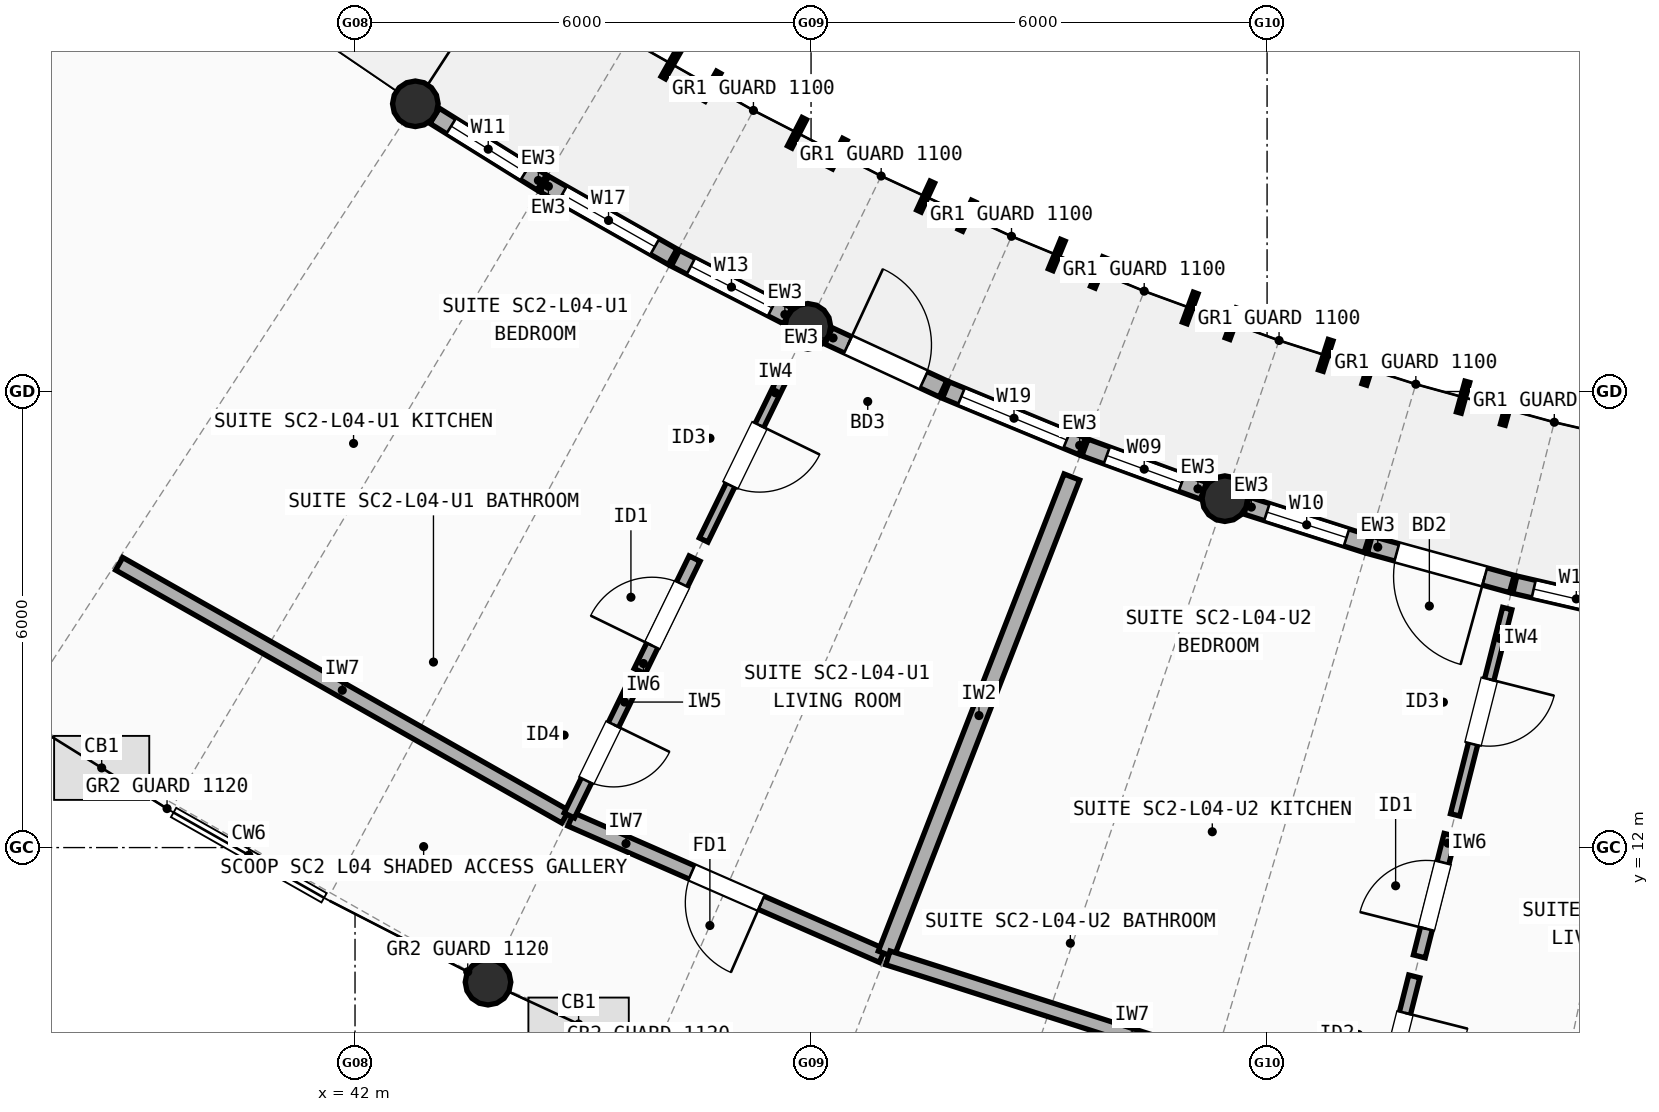
"""IFC4 building model, lengths in metres.
Left out: names, types, materials, properties, quantities, classifications, styles, units other than length and angle.
Written with IfcOpenShell. Run it as: python <this file> out.ifc"""

import sys

from ifc_helpers import new_model, si_unit, direction, frame, frame_2d, origin, origin_2d, place, context, subcontext, project, spatial, rectangle, circle, extrude, element, fill, save


model = new_model("IFC4")
c1 = context("Model", 3, precision=1e-05, world=origin(), true_north=direction((0.0, 1.0)))
c2 = subcontext(c1, "Body", "Model", "MODEL_VIEW")
j1 = project(units=[si_unit("LENGTHUNIT", "METRE"), si_unit("PLANEANGLEUNIT", "RADIAN")], contexts=[c1])
p1 = place(None, origin())
s1 = spatial("IfcSite", under=j1, at=p1, CompositionType="ELEMENT")
p2 = place(p1, origin())
s2 = spatial("IfcBuilding", under=s1, at=p2, CompositionType="ELEMENT")
p3 = place(p2, frame((0.0, 0.0, 14.1)))
s3 = spatial("IfcBuildingStorey", under=s2, at=p3, CompositionType="ELEMENT", Elevation=14.1)
for number, where, z_axis, x_axis in (
    (1, (42.793, 21.785, 0.0), (0.0, 0.0, 1.0), (1.0, 0.0, 0.0)),
    (2, (47.958, 18.858, 0.0), (0.0, 0.0, 1.0), (1.0, 0.0, 0.0)),
    (3, (43.75, 10.229, 0.0), (0.0, 0.0, 1.0), (1.0, 0.0, 0.0)),
    (4, (53.445, 16.59, 0.0), (0.0, 0.0, 1.0), (1.0, 0.0, 0.0)),
):
    element("IfcColumn", number, at=place(p3, frame(where, z_axis=z_axis, x_axis=x_axis)), inside=s3, PredefinedType="COLUMN", context=c2, shape_type="SweptSolid", body=[
        extrude(circle(Radius=0.3, at=origin_2d()), origin(), (0.0, 0.0, 1.0), 2.948),
    ])
p4 = place(p3, frame((43.048, 21.627, 0.0), z_axis=(0.0, 0.0, 1.0), x_axis=(0.848955427013, -0.528464457598, 0.0)))
e5 = element("IfcWall", 5, at=p4, inside=s3, PredefinedType="STANDARD", context=c2, shape_type="SweptSolid", body=[
    extrude(rectangle(XDim=1.66, YDim=0.235, at=frame_2d((0.83, 0.0))), origin(), (0.0, 0.0, 1.0), 2.684),
])
p5 = place(p4, frame((0.255, 0.0, 0.85)))
e6 = element("IfcOpeningElement", 6, at=p5, cuts=e5, PredefinedType="OPENING", context=c2, shape_type="SweptSolid", body=[
    extrude(rectangle(XDim=1.15, YDim=1.45, at=frame_2d((0.575, 0.725))), frame((0.0, 0.127, 0.0), z_axis=(0.0, -1.0, 0.0), x_axis=(1.0, 0.0, 0.0)), (0.0, 0.0, 1.0), 0.255),
])
p6 = place(p3, frame((44.492, 20.729, 0.0), z_axis=(0.0, 0.0, 1.0), x_axis=(0.86993400964, -0.493168144623, 0.0)))
e7 = element("IfcWall", 7, at=p6, inside=s3, PredefinedType="STANDARD", context=c2, shape_type="SweptSolid", body=[
    extrude(rectangle(XDim=1.94, YDim=0.235, at=frame_2d((0.97, 0.0))), origin(), (0.0, 0.0, 1.0), 2.684),
])
p7 = place(p6, frame((0.27, 0.0, 0.85)))
e8 = element("IfcOpeningElement", 8, at=p7, cuts=e7, PredefinedType="OPENING", context=c2, shape_type="SweptSolid", body=[
    extrude(rectangle(XDim=1.4, YDim=1.5, at=frame_2d((0.7, 0.75))), frame((0.0, 0.127, 0.0), z_axis=(0.0, -1.0, 0.0), x_axis=(1.0, 0.0, 0.0)), (0.0, 0.0, 1.0), 0.255),
])
p8 = place(p3, frame((46.215, 19.753, 0.0), z_axis=(0.0, 0.0, 1.0), x_axis=(0.889521792954, -0.456892744372, 0.0)))
e9 = element("IfcWall", 9, at=p8, inside=s3, PredefinedType="STANDARD", context=c2, shape_type="SweptSolid", body=[
    extrude(rectangle(XDim=1.66, YDim=0.235, at=frame_2d((0.83, 0.0))), origin(), (0.0, 0.0, 1.0), 2.684),
])
p9 = place(p8, frame((0.23, 0.0, 0.85)))
e10 = element("IfcOpeningElement", 10, at=p9, cuts=e9, PredefinedType="OPENING", context=c2, shape_type="SweptSolid", body=[
    extrude(rectangle(XDim=1.2, YDim=1.45, at=frame_2d((0.6, 0.725))), frame((0.0, 0.127, 0.0), z_axis=(0.0, -1.0, 0.0), x_axis=(1.0, 0.0, 0.0)), (0.0, 0.0, 1.0), 0.255),
])
p10 = place(p3, frame((48.23, 18.732, 0.0), z_axis=(0.0, 0.0, 1.0), x_axis=(0.907631944022, -0.419766904592, 0.0)))
e11 = element("IfcWall", 11, at=p10, inside=s3, PredefinedType="STANDARD", context=c2, shape_type="SweptSolid", body=[
    extrude(rectangle(XDim=1.66, YDim=0.235, at=frame_2d((0.83, 0.0))), origin(), (0.0, 0.0, 1.0), 2.684),
])
p11 = place(p10, frame((0.28, 0.0, 0.0)))
e12 = element("IfcOpeningElement", 12, at=p11, cuts=e11, PredefinedType="OPENING", context=c2, shape_type="SweptSolid", body=[
    extrude(rectangle(XDim=1.1, YDim=2.15, at=frame_2d((0.55, 1.075))), frame((0.0, 0.127, 0.0), z_axis=(0.0, -1.0, 0.0), x_axis=(1.0, 0.0, 0.0)), (0.0, 0.0, 1.0), 0.255),
])
p12 = place(p3, frame((49.774, 18.019, 0.0), z_axis=(0.0, 0.0, 1.0), x_axis=(0.92414555515, -0.382040564465, 0.0)))
e13 = element("IfcWall", 13, at=p12, inside=s3, PredefinedType="STANDARD", context=c2, shape_type="SweptSolid", body=[
    extrude(rectangle(XDim=1.94, YDim=0.235, at=frame_2d((0.97, 0.0))), origin(), (0.0, 0.0, 1.0), 2.684),
])
p13 = place(p12, frame((0.22, 0.0, 0.85)))
e14 = element("IfcOpeningElement", 14, at=p13, cuts=e13, PredefinedType="OPENING", context=c2, shape_type="SweptSolid", body=[
    extrude(rectangle(XDim=1.5, YDim=1.5, at=frame_2d((0.75, 0.75))), frame((0.0, 0.127, 0.0), z_axis=(0.0, -1.0, 0.0), x_axis=(1.0, 0.0, 0.0)), (0.0, 0.0, 1.0), 0.255),
])
p14 = place(p3, frame((51.604, 17.264, 0.0), z_axis=(0.0, 0.0, 1.0), x_axis=(0.939139054149, -0.343537242482, 0.0)))
e15 = element("IfcWall", 15, at=p14, inside=s3, PredefinedType="STANDARD", context=c2, shape_type="SweptSolid", body=[
    extrude(rectangle(XDim=1.66, YDim=0.235, at=frame_2d((0.83, 0.0))), origin(), (0.0, 0.0, 1.0), 2.684),
])
p15 = place(p14, frame((0.305, 0.0, 0.85)))
e16 = element("IfcOpeningElement", 16, at=p15, cuts=e15, PredefinedType="OPENING", context=c2, shape_type="SweptSolid", body=[
    extrude(rectangle(XDim=1.05, YDim=1.35, at=frame_2d((0.525, 0.675))), frame((0.0, 0.127, 0.0), z_axis=(0.0, -1.0, 0.0), x_axis=(1.0, 0.0, 0.0)), (0.0, 0.0, 1.0), 0.255),
])
p16 = place(p3, frame((53.731, 16.499, 0.0), z_axis=(0.0, 0.0, 1.0), x_axis=(0.952523149859, -0.304466170508, 0.0)))
e17 = element("IfcWall", 17, at=p16, inside=s3, PredefinedType="STANDARD", context=c2, shape_type="SweptSolid", body=[
    extrude(rectangle(XDim=1.66, YDim=0.235, at=frame_2d((0.83, 0.0))), origin(), (0.0, 0.0, 1.0), 2.684),
])
p17 = place(p16, frame((0.28, 0.0, 0.85)))
e18 = element("IfcOpeningElement", 18, at=p17, cuts=e17, PredefinedType="OPENING", context=c2, shape_type="SweptSolid", body=[
    extrude(rectangle(XDim=1.1, YDim=1.45, at=frame_2d((0.55, 0.725))), frame((0.0, 0.127, 0.0), z_axis=(0.0, -1.0, 0.0), x_axis=(1.0, 0.0, 0.0)), (0.0, 0.0, 1.0), 0.255),
])
p18 = place(p3, frame((55.35, 15.982, 0.0), z_axis=(0.0, 0.0, 1.0), x_axis=(0.964271323293, -0.264916619098, 0.0)))
e19 = element("IfcWall", 19, at=p18, inside=s3, PredefinedType="STANDARD", context=c2, shape_type="SweptSolid", body=[
    extrude(rectangle(XDim=1.94, YDim=0.235, at=frame_2d((0.97, 0.0))), origin(), (0.0, 0.0, 1.0), 2.684),
])
p19 = place(p18, frame((0.37, 0.0, 0.0)))
e20 = element("IfcOpeningElement", 20, at=p19, cuts=e19, PredefinedType="OPENING", context=c2, shape_type="SweptSolid", body=[
    extrude(rectangle(XDim=1.2, YDim=2.15, at=frame_2d((0.6, 1.075))), frame((0.0, 0.127, 0.0), z_axis=(0.0, -1.0, 0.0), x_axis=(1.0, 0.0, 0.0)), (0.0, 0.0, 1.0), 0.255),
])
p20 = place(p3, frame((57.26, 15.458, 0.0), z_axis=(0.0, 0.0, 1.0), x_axis=(0.974354001174, -0.225020622158, 0.0)))
e21 = element("IfcWall", 21, at=p20, inside=s3, PredefinedType="STANDARD", context=c2, shape_type="SweptSolid", body=[
    extrude(rectangle(XDim=1.66, YDim=0.235, at=frame_2d((0.83, 0.0))), origin(), (0.0, 0.0, 1.0), 2.684),
])
p21 = place(p20, frame((0.255, 0.0, 0.85)))
e22 = element("IfcOpeningElement", 22, at=p21, cuts=e21, PredefinedType="OPENING", context=c2, shape_type="SweptSolid", body=[
    extrude(rectangle(XDim=1.15, YDim=1.45, at=frame_2d((0.575, 0.725))), frame((0.0, 0.127, 0.0), z_axis=(0.0, -1.0, 0.0), x_axis=(1.0, 0.0, 0.0)), (0.0, 0.0, 1.0), 0.255),
])
p22 = place(p3, frame((38.897, 15.733, 0.0), z_axis=(0.0, 0.0, 1.0), x_axis=(0.86996578951, -0.493112081664, 0.0)))
e23 = element("IfcWall", 23, at=p22, inside=s3, PredefinedType="SOLIDWALL", context=c2, shape_type="SweptSolid", body=[
    extrude(rectangle(XDim=6.747, YDim=0.19, at=frame_2d((3.374, 0.0))), origin(), (0.0, 0.0, 1.0), 2.742),
])
p23 = place(p3, frame((44.838, 12.371, 0.0), z_axis=(0.0, 0.0, 1.0), x_axis=(0.91610596958, -0.40093621999, 0.0)))
e24 = element("IfcWall", 24, at=p23, inside=s3, PredefinedType="SOLIDWALL", context=c2, shape_type="SweptSolid", body=[
    extrude(rectangle(XDim=4.473, YDim=0.19, at=frame_2d((2.237, 0.0))), origin(), (0.0, 0.0, 1.0), 2.742),
])
p24 = place(p23, frame((1.737, 0.0, 0.0)))
e25 = element("IfcOpeningElement", 25, at=p24, cuts=e24, PredefinedType="OPENING", context=c2, shape_type="SweptSolid", body=[
    extrude(rectangle(XDim=1.0, YDim=2.15, at=frame_2d((0.5, 1.075))), frame((0.0, 0.105, 0.0), z_axis=(0.0, -1.0, 0.0), x_axis=(1.0, 0.0, 0.0)), (0.0, 0.0, 1.0), 0.21),
])
p25 = place(p3, frame((47.674, 18.275, 0.0), z_axis=(0.0, 0.0, 1.0), x_axis=(-0.438371263406, -0.898793989421, 0.0)))
e26 = element("IfcWall", 26, at=p25, inside=s3, PredefinedType="PARTITIONING", context=c2, shape_type="SweptSolid", body=[
    extrude(rectangle(XDim=2.48, YDim=0.125, at=frame_2d((1.24, 0.0))), origin(), (0.0, 0.0, 1.0), 2.722),
])
p26 = place(p25, frame((0.8, 0.0, 0.0)))
e27 = element("IfcOpeningElement", 27, at=p26, cuts=e26, PredefinedType="OPENING", context=c2, shape_type="SweptSolid", body=[
    extrude(rectangle(XDim=0.88, YDim=2.1, at=frame_2d((0.44, 1.05))), frame((0.0, 0.073, 0.0), z_axis=(0.0, -1.0, 0.0), x_axis=(1.0, 0.0, 0.0)), (0.0, 0.0, 1.0), 0.145),
])
p27 = place(p3, frame((46.468, 15.802, 0.0), z_axis=(0.0, 0.0, 1.0), x_axis=(-0.438482002729, -0.898739969782, 0.0)))
e28 = element("IfcWall", 28, at=p27, inside=s3, PredefinedType="PLUMBINGWALL", context=c2, shape_type="SweptSolid", body=[
    extrude(rectangle(XDim=1.648, YDim=0.16, at=frame_2d((0.824, 0.0))), origin(), (0.0, 0.0, 1.0), 2.722),
])
p28 = place(p27, frame((0.374, 0.0, 0.0)))
e29 = element("IfcOpeningElement", 29, at=p28, cuts=e28, PredefinedType="OPENING", context=c2, shape_type="SweptSolid", body=[
    extrude(rectangle(XDim=0.9, YDim=2.1, at=frame_2d((0.45, 1.05))), frame((0.0, 0.09, 0.0), z_axis=(0.0, -1.0, 0.0), x_axis=(1.0, 0.0, 0.0)), (0.0, 0.0, 1.0), 0.18),
])
p29 = place(p3, frame((45.626, 14.076, 0.0), z_axis=(0.0, 0.0, 1.0), x_axis=(-0.438488979871, -0.898736565703, 0.0)))
e30 = element("IfcWall", 30, at=p29, inside=s3, PredefinedType="PARTITIONING", context=c2, shape_type="SweptSolid", body=[
    extrude(rectangle(XDim=1.84, YDim=0.15, at=frame_2d((0.92, 0.0))), origin(), (0.0, 0.0, 1.0), 2.722),
])
p30 = place(p29, frame((0.51, 0.0, 0.0)))
e31 = element("IfcOpeningElement", 31, at=p30, cuts=e30, PredefinedType="OPENING", context=c2, shape_type="SweptSolid", body=[
    extrude(rectangle(XDim=0.82, YDim=2.08, at=frame_2d((0.41, 1.04))), frame((0.0, 0.085, 0.0), z_axis=(0.0, -1.0, 0.0), x_axis=(1.0, 0.0, 0.0)), (0.0, 0.0, 1.0), 0.17),
])
p31 = place(p3, frame((51.431, 16.875, 0.0), z_axis=(0.0, 0.0, 1.0), x_axis=(-0.362801288891, -0.931866527341, 0.0)))
e32 = element("IfcWall", 32, at=p31, inside=s3, PredefinedType="SOLIDWALL", context=c2, shape_type="SweptSolid", body=[
    extrude(rectangle(XDim=6.736, YDim=0.22, at=frame_2d((3.368, 0.0))), origin(), (0.0, 0.0, 1.0), 2.762),
])
p32 = place(p3, frame((49.011, 10.549, 0.0), z_axis=(0.0, 0.0, 1.0), x_axis=(0.952529122406, -0.304447484746, 0.0)))
e33 = element("IfcWall", 33, at=p32, inside=s3, PredefinedType="SOLIDWALL", context=c2, shape_type="SweptSolid", body=[
    extrude(rectangle(XDim=6.747, YDim=0.19, at=frame_2d((3.374, 0.0))), origin(), (0.0, 0.0, 1.0), 2.722),
])
p33 = place(p3, frame((57.16, 15.145, 0.0), z_axis=(0.0, 0.0, 1.0), x_axis=(-0.245017317517, -0.969518702304, 0.0)))
e34 = element("IfcWall", 34, at=p33, inside=s3, PredefinedType="PARTITIONING", context=c2, shape_type="SweptSolid", body=[
    extrude(rectangle(XDim=2.8, YDim=0.125, at=frame_2d((1.4, 0.0))), origin(), (0.0, 0.0, 1.0), 2.762),
])
p34 = place(p33, frame((0.96, 0.0, 0.0)))
e35 = element("IfcOpeningElement", 35, at=p34, cuts=e34, PredefinedType="OPENING", context=c2, shape_type="SweptSolid", body=[
    extrude(rectangle(XDim=0.88, YDim=2.1, at=frame_2d((0.44, 1.05))), frame((0.0, 0.073, 0.0), z_axis=(0.0, -1.0, 0.0), x_axis=(1.0, 0.0, 0.0)), (0.0, 0.0, 1.0), 0.145),
])
p35 = place(p3, frame((56.407, 12.167, 0.0), z_axis=(0.0, 0.0, 1.0), x_axis=(-0.245044695728, -0.969511782855, 0.0)))
e36 = element("IfcWall", 36, at=p35, inside=s3, PredefinedType="PLUMBINGWALL", context=c2, shape_type="SweptSolid", body=[
    extrude(rectangle(XDim=1.648, YDim=0.16, at=frame_2d((0.824, 0.0))), origin(), (0.0, 0.0, 1.0), 2.762),
])
p36 = place(p35, frame((0.374, 0.0, 0.0)))
e37 = element("IfcOpeningElement", 37, at=p36, cuts=e36, PredefinedType="OPENING", context=c2, shape_type="SweptSolid", body=[
    extrude(rectangle(XDim=0.9, YDim=2.1, at=frame_2d((0.45, 1.05))), frame((0.0, 0.09, 0.0), z_axis=(0.0, -1.0, 0.0), x_axis=(1.0, 0.0, 0.0)), (0.0, 0.0, 1.0), 0.18),
])
p37 = place(p3, frame((55.937, 10.305, 0.0), z_axis=(0.0, 0.0, 1.0), x_axis=(-0.24497035727, -0.969530568914, 0.0)))
e38 = element("IfcWall", 38, at=p37, inside=s3, PredefinedType="PARTITIONING", context=c2, shape_type="SweptSolid", body=[
    extrude(rectangle(XDim=1.84, YDim=0.15, at=frame_2d((0.92, 0.0))), origin(), (0.0, 0.0, 1.0), 2.762),
])
p38 = place(p37, frame((0.495, 0.0, 0.0)))
e39 = element("IfcOpeningElement", 39, at=p38, cuts=e38, PredefinedType="OPENING", context=c2, shape_type="SweptSolid", body=[
    extrude(rectangle(XDim=0.85, YDim=2.1, at=frame_2d((0.425, 1.05))), frame((0.0, 0.085, 0.0), z_axis=(0.0, -1.0, 0.0), x_axis=(1.0, 0.0, 0.0)), (0.0, 0.0, 1.0), 0.17),
])
p39 = place(p5, origin())
e40 = element("IfcWindow", 40, at=p39, inside=s3, PartitioningType="SINGLE_PANEL", PredefinedType="WINDOW", context=c2, shape_type="SweptSolid", body=[
    extrude(rectangle(XDim=1.15, YDim=1.45, at=frame_2d((0.575, 0.725))), frame((0.0, 0.03, 0.0), z_axis=(0.0, -1.0, 0.0), x_axis=(1.0, 0.0, 0.0)), (0.0, 0.0, 1.0), 0.06),
])
fill(e6, e40)
p40 = place(p7, origin())
e41 = element("IfcWindow", 41, at=p40, inside=s3, PartitioningType="SINGLE_PANEL", PredefinedType="WINDOW", context=c2, shape_type="SweptSolid", body=[
    extrude(rectangle(XDim=1.4, YDim=1.5, at=frame_2d((0.7, 0.75))), frame((0.0, 0.03, 0.0), z_axis=(0.0, -1.0, 0.0), x_axis=(1.0, 0.0, 0.0)), (0.0, 0.0, 1.0), 0.06),
])
fill(e8, e41)
p41 = place(p9, origin())
e42 = element("IfcWindow", 42, at=p41, inside=s3, PartitioningType="SINGLE_PANEL", PredefinedType="WINDOW", context=c2, shape_type="SweptSolid", body=[
    extrude(rectangle(XDim=1.2, YDim=1.45, at=frame_2d((0.6, 0.725))), frame((0.0, 0.03, 0.0), z_axis=(0.0, -1.0, 0.0), x_axis=(1.0, 0.0, 0.0)), (0.0, 0.0, 1.0), 0.06),
])
fill(e10, e42)
p42 = place(p11, origin())
e43 = element("IfcDoor", 43, at=p42, inside=s3, OperationType="SINGLE_SWING_LEFT", PredefinedType="DOOR", context=c2, shape_type="SweptSolid", body=[
    extrude(rectangle(XDim=1.1, YDim=2.15, at=frame_2d((0.55, 1.075))), frame((0.0, 0.025, 0.0), z_axis=(0.0, -1.0, 0.0), x_axis=(1.0, 0.0, 0.0)), (0.0, 0.0, 1.0), 0.05),
])
fill(e12, e43)
p43 = place(p13, origin())
e44 = element("IfcWindow", 44, at=p43, inside=s3, PartitioningType="SINGLE_PANEL", PredefinedType="WINDOW", context=c2, shape_type="SweptSolid", body=[
    extrude(rectangle(XDim=1.5, YDim=1.5, at=frame_2d((0.75, 0.75))), frame((0.0, 0.03, 0.0), z_axis=(0.0, -1.0, 0.0), x_axis=(1.0, 0.0, 0.0)), (0.0, 0.0, 1.0), 0.06),
])
fill(e14, e44)
p44 = place(p15, origin())
e45 = element("IfcWindow", 45, at=p44, inside=s3, PartitioningType="SINGLE_PANEL", PredefinedType="WINDOW", context=c2, shape_type="SweptSolid", body=[
    extrude(rectangle(XDim=1.05, YDim=1.35, at=frame_2d((0.525, 0.675))), frame((0.0, 0.03, 0.0), z_axis=(0.0, -1.0, 0.0), x_axis=(1.0, 0.0, 0.0)), (0.0, 0.0, 1.0), 0.06),
])
fill(e16, e45)
p45 = place(p17, origin())
e46 = element("IfcWindow", 46, at=p45, inside=s3, PartitioningType="SINGLE_PANEL", PredefinedType="WINDOW", context=c2, shape_type="SweptSolid", body=[
    extrude(rectangle(XDim=1.1, YDim=1.45, at=frame_2d((0.55, 0.725))), frame((0.0, 0.03, 0.0), z_axis=(0.0, -1.0, 0.0), x_axis=(1.0, 0.0, 0.0)), (0.0, 0.0, 1.0), 0.06),
])
fill(e18, e46)
p46 = place(p19, origin())
e47 = element("IfcDoor", 47, at=p46, inside=s3, OperationType="SINGLE_SWING_RIGHT", PredefinedType="DOOR", context=c2, shape_type="SweptSolid", body=[
    extrude(rectangle(XDim=1.2, YDim=2.15, at=frame_2d((0.6, 1.075))), frame((0.0, 0.025, 0.0), z_axis=(0.0, -1.0, 0.0), x_axis=(1.0, 0.0, 0.0)), (0.0, 0.0, 1.0), 0.05),
])
fill(e20, e47)
p47 = place(p21, origin())
e48 = element("IfcWindow", 48, at=p47, inside=s3, PartitioningType="SINGLE_PANEL", PredefinedType="WINDOW", context=c2, shape_type="SweptSolid", body=[
    extrude(rectangle(XDim=1.15, YDim=1.45, at=frame_2d((0.575, 0.725))), frame((0.0, 0.03, 0.0), z_axis=(0.0, -1.0, 0.0), x_axis=(1.0, 0.0, 0.0)), (0.0, 0.0, 1.0), 0.06),
])
fill(e22, e48)
p48 = place(p24, origin())
e49 = element("IfcDoor", 49, at=p48, inside=s3, OperationType="SINGLE_SWING_RIGHT", PredefinedType="DOOR", context=c2, shape_type="SweptSolid", body=[
    extrude(rectangle(XDim=1.0, YDim=2.15, at=frame_2d((0.5, 1.075))), frame((0.0, 0.025, 0.0), z_axis=(0.0, -1.0, 0.0), x_axis=(1.0, 0.0, 0.0)), (0.0, 0.0, 1.0), 0.05),
])
fill(e25, e49)
p49 = place(p26, origin())
e50 = element("IfcDoor", 50, at=p49, inside=s3, OperationType="SINGLE_SWING_LEFT", PredefinedType="DOOR", context=c2, shape_type="SweptSolid", body=[
    extrude(rectangle(XDim=0.88, YDim=2.1, at=frame_2d((0.44, 1.05))), frame((0.0, 0.025, 0.0), z_axis=(0.0, -1.0, 0.0), x_axis=(1.0, 0.0, 0.0)), (0.0, 0.0, 1.0), 0.05),
])
fill(e27, e50)
p50 = place(p28, origin())
e51 = element("IfcDoor", 51, at=p50, inside=s3, OperationType="SINGLE_SWING_RIGHT", PredefinedType="DOOR", context=c2, shape_type="SweptSolid", body=[
    extrude(rectangle(XDim=0.9, YDim=2.1, at=frame_2d((0.45, 1.05))), frame((0.0, 0.025, 0.0), z_axis=(0.0, -1.0, 0.0), x_axis=(1.0, 0.0, 0.0)), (0.0, 0.0, 1.0), 0.05),
])
fill(e29, e51)
p51 = place(p30, origin())
e52 = element("IfcDoor", 52, at=p51, inside=s3, OperationType="SINGLE_SWING_LEFT", PredefinedType="DOOR", context=c2, shape_type="SweptSolid", body=[
    extrude(rectangle(XDim=0.82, YDim=2.08, at=frame_2d((0.41, 1.04))), frame((0.0, 0.025, 0.0), z_axis=(0.0, -1.0, 0.0), x_axis=(1.0, 0.0, 0.0)), (0.0, 0.0, 1.0), 0.05),
])
fill(e31, e52)
p52 = place(p34, origin())
e53 = element("IfcDoor", 53, at=p52, inside=s3, OperationType="SINGLE_SWING_LEFT", PredefinedType="DOOR", context=c2, shape_type="SweptSolid", body=[
    extrude(rectangle(XDim=0.88, YDim=2.1, at=frame_2d((0.44, 1.05))), frame((0.0, 0.025, 0.0), z_axis=(0.0, -1.0, 0.0), x_axis=(1.0, 0.0, 0.0)), (0.0, 0.0, 1.0), 0.05),
])
fill(e35, e53)
p53 = place(p36, origin())
e54 = element("IfcDoor", 54, at=p53, inside=s3, OperationType="SINGLE_SWING_RIGHT", PredefinedType="DOOR", context=c2, shape_type="SweptSolid", body=[
    extrude(rectangle(XDim=0.9, YDim=2.1, at=frame_2d((0.45, 1.05))), frame((0.0, 0.025, 0.0), z_axis=(0.0, -1.0, 0.0), x_axis=(1.0, 0.0, 0.0)), (0.0, 0.0, 1.0), 0.05),
])
fill(e37, e54)
p54 = place(p38, origin())
e55 = element("IfcDoor", 55, at=p54, inside=s3, OperationType="SINGLE_SWING_LEFT", PredefinedType="DOOR", context=c2, shape_type="SweptSolid", body=[
    extrude(rectangle(XDim=0.85, YDim=2.1, at=frame_2d((0.425, 1.05))), frame((0.0, 0.025, 0.0), z_axis=(0.0, -1.0, 0.0), x_axis=(1.0, 0.0, 0.0)), (0.0, 0.0, 1.0), 0.05),
])
fill(e39, e55)
save(model, sys.argv[1])
